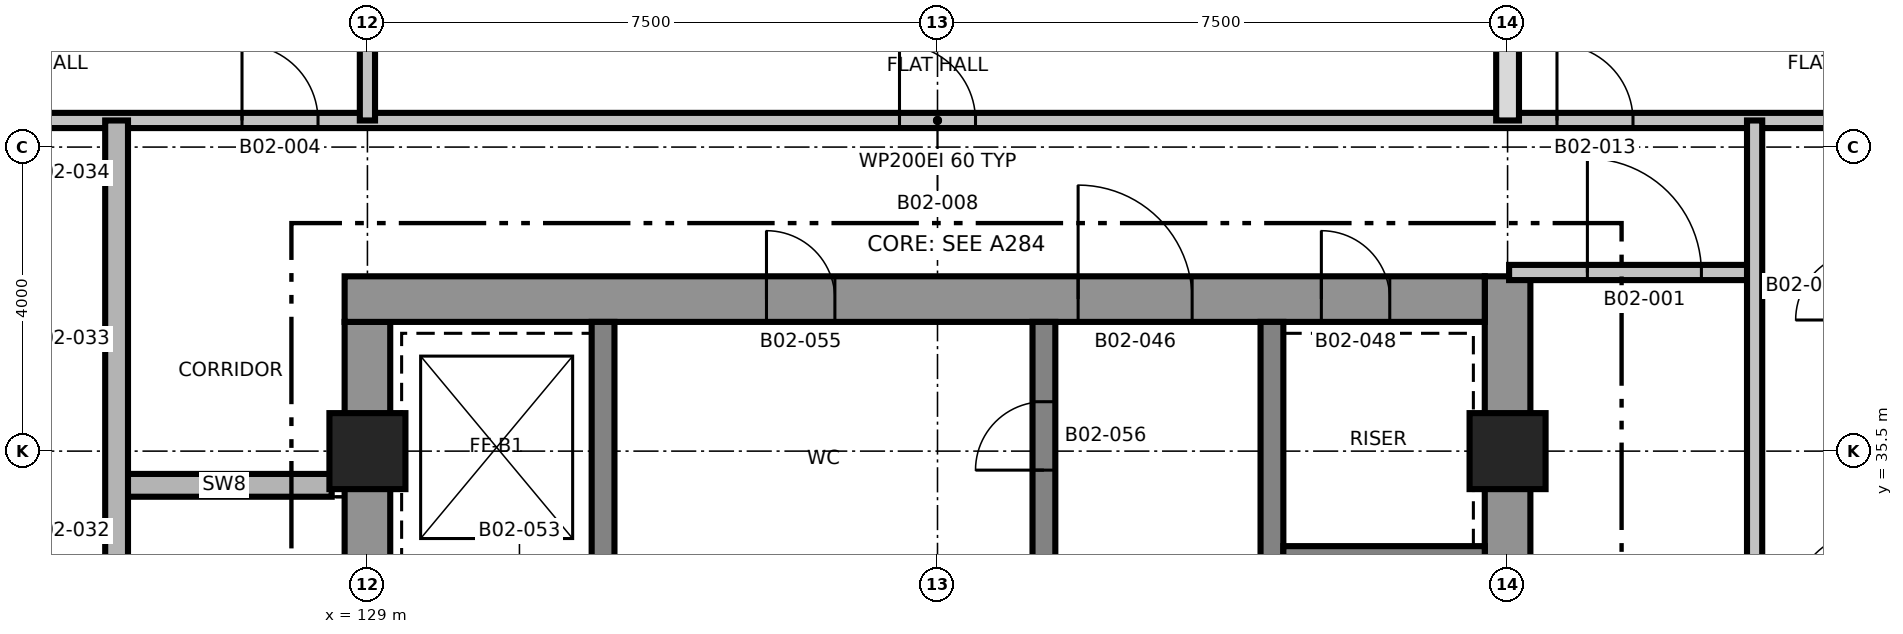
"""IFC4 building model, lengths in metres.
Left out: names, types, materials, properties, quantities, classifications, styles, units other than length and angle.
Written with IfcOpenShell. Run it as: python <this file> out.ifc"""

import sys

from ifc_helpers import new_model, si_unit, direction, frame, frame_2d, origin, origin_2d, place, context, subcontext, project, spatial, rectangle, extrude, element, fill, save


model = new_model("IFC4")
c1 = context("Model", 3, precision=1e-05, world=origin(), true_north=direction((0.0, 1.0)))
c2 = subcontext(c1, "Body", "Model", "MODEL_VIEW")
j1 = project(units=[si_unit("LENGTHUNIT", "METRE"), si_unit("PLANEANGLEUNIT", "RADIAN")], contexts=[c1])
p1 = place(None, origin())
s1 = spatial("IfcSite", under=j1, at=p1, CompositionType="ELEMENT")
p2 = place(p1, origin())
s2 = spatial("IfcBuilding", under=s1, at=p2, CompositionType="ELEMENT")
p3 = place(p2, frame((0.0, 0.0, 48.3)))
s3 = spatial("IfcBuildingStorey", under=s2, at=p3, CompositionType="ELEMENT", Elevation=48.3)
p4 = place(p3, frame((129.0, 24.8, 0.0), z_axis=(0.0, 0.0, 1.0), x_axis=(0.0, 1.0, 0.0)))
e1 = element("IfcWall", 1, at=p4, inside=s3, PredefinedType="SHEAR", context=c2, shape_type="SweptSolid", body=[
    extrude(rectangle(XDim=12.4, YDim=0.6, at=frame_2d((6.2, 0.0))), origin(), (0.0, 0.0, 1.0), 3.7),
])
p5 = place(p4, frame((5.15, 0.0, 0.0)))
e2 = element("IfcOpeningElement", 2, at=p5, cuts=e1, PredefinedType="OPENING", context=c2, shape_type="SweptSolid", body=[
    extrude(rectangle(XDim=1.0, YDim=2.1, at=frame_2d((0.5, 1.05))), frame((0.0, 0.31, 0.0), z_axis=(0.0, -1.0, 0.0), x_axis=(1.0, 0.0, 0.0)), (0.0, 0.0, 1.0), 0.62),
])
p6 = place(p3, frame((144.0, 24.2, 0.0), z_axis=(0.0, 0.0, 1.0), x_axis=(0.0, 1.0, 0.0)))
e3 = element("IfcWall", 3, at=p6, inside=s3, PredefinedType="SHEAR", context=c2, shape_type="SweptSolid", body=[
    extrude(rectangle(XDim=13.6, YDim=0.6, at=frame_2d((6.8, 0.0))), origin(), (0.0, 0.0, 1.0), 3.7),
])
p7 = place(p3, frame((128.7, 37.5, 0.0), z_axis=(0.0, 0.0, 1.0), x_axis=(1.0, 0.0, 0.0)))
e4 = element("IfcWall", 4, at=p7, inside=s3, PredefinedType="SHEAR", context=c2, shape_type="SweptSolid", body=[
    extrude(rectangle(XDim=15.0, YDim=0.6, at=frame_2d((7.5, 0.0))), origin(), (0.0, 0.0, 1.0), 3.7),
])
p8 = place(p7, frame((9.65, 0.0, 0.0)))
e5 = element("IfcOpeningElement", 5, at=p8, cuts=e4, PredefinedType="OPENING", context=c2, shape_type="SweptSolid", body=[
    extrude(rectangle(XDim=1.5, YDim=2.1, at=frame_2d((0.75, 1.05))), frame((0.0, 0.31, 0.0), z_axis=(0.0, -1.0, 0.0), x_axis=(1.0, 0.0, 0.0)), (0.0, 0.0, 1.0), 0.62),
])
p9 = place(p7, frame((12.85, 0.0, 0.0)))
e6 = element("IfcOpeningElement", 6, at=p9, cuts=e4, PredefinedType="OPENING", context=c2, shape_type="SweptSolid", body=[
    extrude(rectangle(XDim=0.9, YDim=2.1, at=frame_2d((0.45, 1.05))), frame((0.0, 0.31, 0.0), z_axis=(0.0, -1.0, 0.0), x_axis=(1.0, 0.0, 0.0)), (0.0, 0.0, 1.0), 0.62),
])
p10 = place(p7, frame((5.55, 0.0, 0.0)))
e7 = element("IfcOpeningElement", 7, at=p10, cuts=e4, PredefinedType="OPENING", context=c2, shape_type="SweptSolid", body=[
    extrude(rectangle(XDim=0.9, YDim=2.1, at=frame_2d((0.45, 1.05))), frame((0.0, 0.31, 0.0), z_axis=(0.0, -1.0, 0.0), x_axis=(1.0, 0.0, 0.0)), (0.0, 0.0, 1.0), 0.62),
])
p11 = place(p3, frame((132.1, 24.8, 0.0), z_axis=(0.0, 0.0, 1.0), x_axis=(0.0, 1.0, 0.0)))
e8 = element("IfcWall", 8, at=p11, inside=s3, PredefinedType="SHEAR", context=c2, shape_type="SweptSolid", body=[
    extrude(rectangle(XDim=12.4, YDim=0.3, at=frame_2d((6.2, 0.0))), origin(), (0.0, 0.0, 1.0), 3.7),
])
p12 = place(p11, frame((3.9, 0.0, 0.0)))
e9 = element("IfcOpeningElement", 9, at=p12, cuts=e8, PredefinedType="OPENING", context=c2, shape_type="SweptSolid", body=[
    extrude(rectangle(XDim=1.2, YDim=2.1, at=frame_2d((0.6, 1.05))), frame((0.0, 0.16, 0.0), z_axis=(0.0, -1.0, 0.0), x_axis=(1.0, 0.0, 0.0)), (0.0, 0.0, 1.0), 0.32),
])
p13 = place(p3, frame((137.9, 24.8, 0.0), z_axis=(0.0, 0.0, 1.0), x_axis=(0.0, 1.0, 0.0)))
e10 = element("IfcWall", 10, at=p13, inside=s3, PredefinedType="SHEAR", context=c2, shape_type="SweptSolid", body=[
    extrude(rectangle(XDim=12.4, YDim=0.3, at=frame_2d((6.2, 0.0))), origin(), (0.0, 0.0, 1.0), 3.7),
])
p14 = place(p13, frame((3.95, 0.0, 0.0)))
e11 = element("IfcOpeningElement", 11, at=p14, cuts=e10, PredefinedType="OPENING", context=c2, shape_type="SweptSolid", body=[
    extrude(rectangle(XDim=1.5, YDim=2.1, at=frame_2d((0.75, 1.05))), frame((0.0, 0.16, 0.0), z_axis=(0.0, -1.0, 0.0), x_axis=(1.0, 0.0, 0.0)), (0.0, 0.0, 1.0), 0.32),
])
p15 = place(p13, frame((10.45, 0.0, 0.0)))
e12 = element("IfcOpeningElement", 12, at=p15, cuts=e10, PredefinedType="OPENING", context=c2, shape_type="SweptSolid", body=[
    extrude(rectangle(XDim=0.9, YDim=2.1, at=frame_2d((0.45, 1.05))), frame((0.0, 0.16, 0.0), z_axis=(0.0, -1.0, 0.0), x_axis=(1.0, 0.0, 0.0)), (0.0, 0.0, 1.0), 0.32),
])
p16 = place(p3, frame((140.9, 24.8, 0.0), z_axis=(0.0, 0.0, 1.0), x_axis=(0.0, 1.0, 0.0)))
e13 = element("IfcWall", 13, at=p16, inside=s3, PredefinedType="SHEAR", context=c2, shape_type="SweptSolid", body=[
    extrude(rectangle(XDim=12.4, YDim=0.3, at=frame_2d((6.2, 0.0))), origin(), (0.0, 0.0, 1.0), 3.7),
])
p17 = place(p16, frame((5.9, 0.0, 0.0)))
e14 = element("IfcOpeningElement", 14, at=p17, cuts=e13, PredefinedType="OPENING", context=c2, shape_type="SweptSolid", body=[
    extrude(rectangle(XDim=1.2, YDim=2.1, at=frame_2d((0.6, 1.05))), frame((0.0, 0.16, 0.0), z_axis=(0.0, -1.0, 0.0), x_axis=(1.0, 0.0, 0.0)), (0.0, 0.0, 1.0), 0.32),
])
p18 = place(p3, frame((141.05, 34.1, 0.0), z_axis=(0.0, 0.0, 1.0), x_axis=(1.0, 0.0, 0.0)))
e15 = element("IfcWall", 15, at=p18, inside=s3, PredefinedType="SHEAR", context=c2, shape_type="SweptSolid", body=[
    extrude(rectangle(XDim=2.65, YDim=0.3, at=frame_2d((1.325, 0.0))), origin(), (0.0, 0.0, 1.0), 3.7),
])
for number, where, z_axis, x_axis in (
    (16, (129.0, 35.5, 0.0), (0.0, 0.0, 1.0), (1.0, 0.0, 0.0)),
    (17, (144.0, 35.5, 0.0), (0.0, 0.0, 1.0), (1.0, 0.0, 0.0)),
):
    element("IfcColumn", number, at=place(p3, frame(where, z_axis=z_axis, x_axis=x_axis)), inside=s3, PredefinedType="COLUMN", context=c2, shape_type="SweptSolid", body=[
        extrude(rectangle(XDim=1.0, YDim=1.0, at=origin_2d()), origin(), (0.0, 0.0, 1.0), 3.7),
    ])
p19 = place(p3, frame((125.7, 35.05, 0.0), z_axis=(0.0, 0.0, 1.0), x_axis=(1.0, 0.0, 0.0)))
e18 = element("IfcWall", 18, at=p19, inside=s3, PredefinedType="SHEAR", context=c2, shape_type="SweptSolid", body=[
    extrude(rectangle(XDim=2.83, YDim=0.3, at=frame_2d((1.415, 0.0))), origin(), (0.0, 0.0, 1.0), 3.4),
])
p20 = place(p3, frame((144.02, 37.85, 0.0), z_axis=(0.0, 0.0, 1.0), x_axis=(1.0, 0.0, 0.0)))
e19 = element("IfcWall", 19, at=p20, inside=s3, PredefinedType="PARTITIONING", context=c2, shape_type="SweptSolid", body=[
    extrude(rectangle(XDim=3.23, YDim=0.2, at=frame_2d((1.615, 0.0))), origin(), (0.0, 0.0, 1.0), 3.4),
])
p21 = place(p20, frame((1.03, 0.0, 0.0)))
e20 = element("IfcOpeningElement", 20, at=p21, cuts=e19, PredefinedType="OPENING", context=c2, shape_type="SweptSolid", body=[
    extrude(rectangle(XDim=1.5, YDim=2.1, at=frame_2d((0.75, 1.05))), frame((0.0, 0.11, 0.0), z_axis=(0.0, -1.0, 0.0), x_axis=(1.0, 0.0, 0.0)), (0.0, 0.0, 1.0), 0.22),
])
p22 = place(p3, frame((120.235, 39.85, 0.0), z_axis=(0.0, 0.0, 1.0), x_axis=(1.0, 0.0, 0.0)))
e21 = element("IfcWall", 21, at=p22, inside=s3, PredefinedType="PARTITIONING", context=c2, shape_type="SweptSolid", body=[
    extrude(rectangle(XDim=32.53, YDim=0.2, at=frame_2d((16.265, 0.0))), origin(), (0.0, 0.0, 1.0), 3.4),
])
p23 = place(p22, frame((7.115, 0.0, 0.0)))
e22 = element("IfcOpeningElement", 22, at=p23, cuts=e21, PredefinedType="OPENING", context=c2, shape_type="SweptSolid", body=[
    extrude(rectangle(XDim=1.0, YDim=2.1, at=frame_2d((0.5, 1.05))), frame((0.0, 0.11, 0.0), z_axis=(0.0, -1.0, 0.0), x_axis=(1.0, 0.0, 0.0)), (0.0, 0.0, 1.0), 0.22),
])
p24 = place(p22, frame((15.765, 0.0, 0.0)))
e23 = element("IfcOpeningElement", 23, at=p24, cuts=e21, PredefinedType="OPENING", context=c2, shape_type="SweptSolid", body=[
    extrude(rectangle(XDim=1.0, YDim=2.1, at=frame_2d((0.5, 1.05))), frame((0.0, 0.11, 0.0), z_axis=(0.0, -1.0, 0.0), x_axis=(1.0, 0.0, 0.0)), (0.0, 0.0, 1.0), 0.22),
])
p25 = place(p22, frame((24.415, 0.0, 0.0)))
e24 = element("IfcOpeningElement", 24, at=p25, cuts=e21, PredefinedType="OPENING", context=c2, shape_type="SweptSolid", body=[
    extrude(rectangle(XDim=1.0, YDim=2.1, at=frame_2d((0.5, 1.05))), frame((0.0, 0.11, 0.0), z_axis=(0.0, -1.0, 0.0), x_axis=(1.0, 0.0, 0.0)), (0.0, 0.0, 1.0), 0.22),
])
p26 = place(p3, frame((125.7, 22.15, 0.0), z_axis=(0.0, 0.0, 1.0), x_axis=(0.0, 1.0, 0.0)))
e25 = element("IfcWall", 25, at=p26, inside=s3, PredefinedType="SHEAR", context=c2, shape_type="SweptSolid", body=[
    extrude(rectangle(XDim=17.7, YDim=0.3, at=frame_2d((8.85, 0.0))), origin(), (0.0, 0.0, 1.0), 3.4),
])
p27 = place(p26, frame((2.7, 0.0, 0.0)))
e26 = element("IfcOpeningElement", 26, at=p27, cuts=e25, PredefinedType="OPENING", context=c2, shape_type="SweptSolid", body=[
    extrude(rectangle(XDim=1.0, YDim=2.1, at=frame_2d((0.5, 1.05))), frame((0.0, 0.16, 0.0), z_axis=(0.0, -1.0, 0.0), x_axis=(1.0, 0.0, 0.0)), (0.0, 0.0, 1.0), 0.32),
])
p28 = place(p3, frame((129.0, 39.85, 0.0), z_axis=(0.0, 0.0, 1.0), x_axis=(0.0, 1.0, 0.0)))
e27 = element("IfcWall", 27, at=p28, inside=s3, PredefinedType="PARTITIONING", context=c2, shape_type="SweptSolid", body=[
    extrude(rectangle(XDim=5.915, YDim=0.2, at=frame_2d((2.958, 0.0))), origin(), (0.0, 0.0, 1.0), 3.4),
])
p29 = place(p3, frame((144.0, 39.85, 0.0), z_axis=(0.0, 0.0, 1.0), x_axis=(0.0, 1.0, 0.0)))
e28 = element("IfcWall", 28, at=p29, inside=s3, PredefinedType="PARTITIONING", context=c2, shape_type="SweptSolid", body=[
    extrude(rectangle(XDim=5.915, YDim=0.3, at=frame_2d((2.958, 0.0))), origin(), (0.0, 0.0, 1.0), 3.4),
])
p30 = place(p3, frame((147.25, 22.15, 0.0), z_axis=(0.0, 0.0, 1.0), x_axis=(0.0, 1.0, 0.0)))
e29 = element("IfcWall", 29, at=p30, inside=s3, PredefinedType="PARTITIONING", context=c2, shape_type="SweptSolid", body=[
    extrude(rectangle(XDim=17.7, YDim=0.2, at=frame_2d((8.85, 0.0))), origin(), (0.0, 0.0, 1.0), 3.4),
])
p31 = place(p30, frame((2.65, 0.0, 0.0)))
e30 = element("IfcOpeningElement", 30, at=p31, cuts=e29, PredefinedType="OPENING", context=c2, shape_type="SweptSolid", body=[
    extrude(rectangle(XDim=1.0, YDim=2.1, at=frame_2d((0.5, 1.05))), frame((0.0, 0.11, 0.0), z_axis=(0.0, -1.0, 0.0), x_axis=(1.0, 0.0, 0.0)), (0.0, 0.0, 1.0), 0.22),
])
p32 = place(p21, origin())
e31 = element("IfcDoor", 31, at=p32, inside=s3, OperationType="SINGLE_SWING_LEFT", PredefinedType="DOOR", context=c2, shape_type="SweptSolid", body=[
    extrude(rectangle(XDim=1.5, YDim=2.1, at=frame_2d((0.75, 1.05))), frame((0.0, 0.025, 0.0), z_axis=(0.0, -1.0, 0.0), x_axis=(1.0, 0.0, 0.0)), (0.0, 0.0, 1.0), 0.05),
])
fill(e20, e31)
p33 = place(p23, origin())
e32 = element("IfcDoor", 32, at=p33, inside=s3, OperationType="SINGLE_SWING_RIGHT", PredefinedType="DOOR", context=c2, shape_type="SweptSolid", body=[
    extrude(rectangle(XDim=1.0, YDim=2.1, at=frame_2d((0.5, 1.05))), frame((0.0, 0.025, 0.0), z_axis=(0.0, -1.0, 0.0), x_axis=(1.0, 0.0, 0.0)), (0.0, 0.0, 1.0), 0.05),
])
fill(e22, e32)
p34 = place(p24, origin())
e33 = element("IfcDoor", 33, at=p34, inside=s3, OperationType="SINGLE_SWING_RIGHT", PredefinedType="DOOR", context=c2, shape_type="SweptSolid", body=[
    extrude(rectangle(XDim=1.0, YDim=2.1, at=frame_2d((0.5, 1.05))), frame((0.0, 0.025, 0.0), z_axis=(0.0, -1.0, 0.0), x_axis=(1.0, 0.0, 0.0)), (0.0, 0.0, 1.0), 0.05),
])
fill(e23, e33)
p35 = place(p25, origin())
e34 = element("IfcDoor", 34, at=p35, inside=s3, OperationType="SINGLE_SWING_LEFT", PredefinedType="DOOR", context=c2, shape_type="SweptSolid", body=[
    extrude(rectangle(XDim=1.0, YDim=2.1, at=frame_2d((0.5, 1.05))), frame((0.0, 0.025, 0.0), z_axis=(0.0, -1.0, 0.0), x_axis=(1.0, 0.0, 0.0)), (0.0, 0.0, 1.0), 0.05),
])
fill(e24, e34)
p36 = place(p8, origin())
e35 = element("IfcDoor", 35, at=p36, inside=s3, OperationType="SINGLE_SWING_RIGHT", PredefinedType="DOOR", context=c2, shape_type="SweptSolid", body=[
    extrude(rectangle(XDim=1.5, YDim=2.1, at=frame_2d((0.75, 1.05))), frame((0.0, 0.025, 0.0), z_axis=(0.0, -1.0, 0.0), x_axis=(1.0, 0.0, 0.0)), (0.0, 0.0, 1.0), 0.05),
])
fill(e5, e35)
p37 = place(p9, origin())
e36 = element("IfcDoor", 36, at=p37, inside=s3, OperationType="SINGLE_SWING_RIGHT", PredefinedType="DOOR", context=c2, shape_type="SweptSolid", body=[
    extrude(rectangle(XDim=0.9, YDim=2.1, at=frame_2d((0.45, 1.05))), frame((0.0, 0.025, 0.0), z_axis=(0.0, -1.0, 0.0), x_axis=(1.0, 0.0, 0.0)), (0.0, 0.0, 1.0), 0.05),
])
fill(e6, e36)
p38 = place(p10, origin())
e37 = element("IfcDoor", 37, at=p38, inside=s3, OperationType="SINGLE_SWING_LEFT", PredefinedType="DOOR", context=c2, shape_type="SweptSolid", body=[
    extrude(rectangle(XDim=0.9, YDim=2.1, at=frame_2d((0.45, 1.05))), frame((0.0, 0.025, 0.0), z_axis=(0.0, -1.0, 0.0), x_axis=(1.0, 0.0, 0.0)), (0.0, 0.0, 1.0), 0.05),
])
fill(e7, e37)
p39 = place(p15, origin())
e38 = element("IfcDoor", 38, at=p39, inside=s3, OperationType="SINGLE_SWING_RIGHT", PredefinedType="DOOR", context=c2, shape_type="SweptSolid", body=[
    extrude(rectangle(XDim=0.9, YDim=2.1, at=frame_2d((0.45, 1.05))), frame((0.0, 0.025, 0.0), z_axis=(0.0, -1.0, 0.0), x_axis=(1.0, 0.0, 0.0)), (0.0, 0.0, 1.0), 0.05),
])
fill(e12, e38)
save(model, sys.argv[1])
